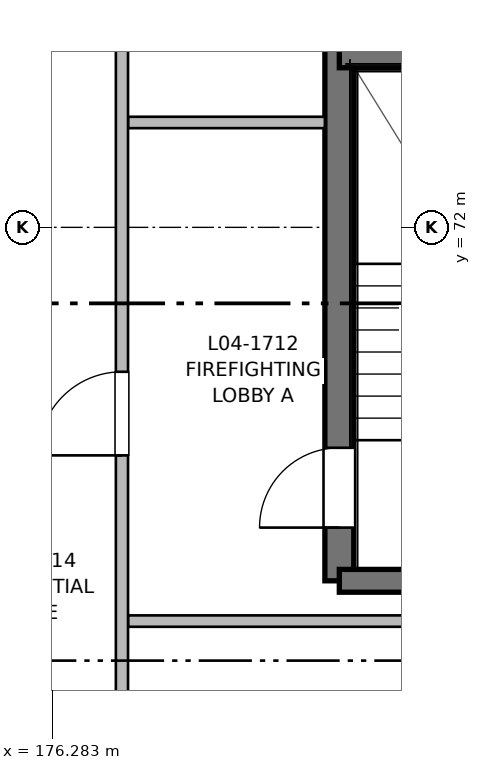
"""IFC4 building model, lengths in metres.
Left out: names, types, materials, properties, quantities, classifications, styles, units other than length and angle.
Written with IfcOpenShell. Run it as: python <this file> out.ifc"""

import sys

from ifc_helpers import new_model, si_unit, direction, frame, frame_2d, origin, place, context, subcontext, project, spatial, rectangle, extrude, element, fill, save


model = new_model("IFC4")
c1 = context("Model", 3, precision=1e-05, world=origin(), true_north=direction((0.0, 1.0)))
c2 = subcontext(c1, "Body", "Model", "MODEL_VIEW")
j1 = project(units=[si_unit("LENGTHUNIT", "METRE"), si_unit("PLANEANGLEUNIT", "RADIAN")], contexts=[c1])
p1 = place(None, origin())
s1 = spatial("IfcSite", under=j1, at=p1, CompositionType="ELEMENT")
p2 = place(p1, origin())
s2 = spatial("IfcBuilding", under=s1, at=p2, CompositionType="ELEMENT")
p3 = place(p2, frame((0.0, 0.0, 13.76)))
s3 = spatial("IfcBuildingStorey", under=s2, at=p3, CompositionType="ELEMENT", Elevation=13.76)
p4 = place(p3, frame((180.06, 67.35, 0.0), z_axis=(0.0, 0.0, 1.0), x_axis=(0.0, 1.0, 0.0)))
e1 = element("IfcWall", 1, at=p4, inside=s3, PredefinedType="SHEAR", context=c2, shape_type="SweptSolid", body=[
    extrude(rectangle(XDim=13.15, YDim=0.38, at=frame_2d((6.575, 0.0))), origin(), (0.0, 0.0, 1.0), 3.2),
])
p5 = place(p4, frame((0.7, 0.0, 0.0)))
e2 = element("IfcOpeningElement", 2, at=p5, cuts=e1, PredefinedType="OPENING", context=c2, shape_type="SweptSolid", body=[
    extrude(rectangle(XDim=1.05, YDim=2.15, at=frame_2d((0.525, 1.075))), frame((0.0, 0.2, 0.0), z_axis=(0.0, -1.0, 0.0), x_axis=(1.0, 0.0, 0.0)), (0.0, 0.0, 1.0), 0.4),
])
p6 = place(p3, frame((183.47, 67.35, 0.0), z_axis=(0.0, 0.0, 1.0), x_axis=(-1.0, 0.0, 0.0)))
e3 = element("IfcWall", 3, at=p6, inside=s3, PredefinedType="SHEAR", context=c2, shape_type="SweptSolid", body=[
    extrude(rectangle(XDim=3.41, YDim=0.3, at=frame_2d((1.705, 0.0))), origin(), (0.0, 0.0, 1.0), 3.2),
])
p7 = place(p3, frame((180.06, 74.24, 0.0), z_axis=(0.0, 0.0, 1.0), x_axis=(1.0, 0.0, 0.0)))
e4 = element("IfcWall", 4, at=p7, inside=s3, PredefinedType="SHEAR", context=c2, shape_type="SweptSolid", body=[
    extrude(rectangle(XDim=3.41, YDim=0.28, at=frame_2d((1.705, 0.0))), origin(), (0.0, 0.0, 1.0), 3.2),
])
p8 = place(p3, frame((177.28, 66.82, 0.0), z_axis=(0.0, 0.0, 1.0), x_axis=(1.0, 0.0, 0.0)))
e5 = element("IfcWall", 5, at=p8, inside=s3, PredefinedType="PARTITIONING", context=c2, shape_type="SweptSolid", body=[
    extrude(rectangle(XDim=6.6, YDim=0.15, at=frame_2d((3.3, 0.0))), origin(), (0.0, 0.0, 1.0), 2.935),
])
p9 = place(p3, frame((177.28, 73.38, 0.0), z_axis=(0.0, 0.0, 1.0), x_axis=(1.0, 0.0, 0.0)))
e6 = element("IfcWall", 6, at=p9, inside=s3, PredefinedType="PARTITIONING", context=c2, shape_type="SweptSolid", body=[
    extrude(rectangle(XDim=2.59, YDim=0.15, at=frame_2d((1.295, 0.0))), origin(), (0.0, 0.0, 1.0), 2.935),
])
p10 = place(p3, frame((177.2, 56.16, 0.0), z_axis=(0.0, 0.0, 1.0), x_axis=(0.0, 1.0, 0.0)))
e7 = element("IfcWall", 7, at=p10, inside=s3, PredefinedType="PARTITIONING", context=c2, shape_type="SweptSolid", body=[
    extrude(rectangle(XDim=50.64, YDim=0.16, at=frame_2d((25.32, 0.0))), origin(), (0.0, 0.0, 1.0), 2.935),
])
p11 = place(p10, frame((12.84, 0.0, 0.0)))
e8 = element("IfcOpeningElement", 8, at=p11, cuts=e7, PredefinedType="OPENING", context=c2, shape_type="SweptSolid", body=[
    extrude(rectangle(XDim=1.1, YDim=2.15, at=frame_2d((0.55, 1.075))), frame((0.0, 0.09, 0.0), z_axis=(0.0, -1.0, 0.0), x_axis=(1.0, 0.0, 0.0)), (0.0, 0.0, 1.0), 0.18),
])
p12 = place(p10, frame((19.24, 0.0, 0.0)))
e9 = element("IfcOpeningElement", 9, at=p12, cuts=e7, PredefinedType="OPENING", context=c2, shape_type="SweptSolid", body=[
    extrude(rectangle(XDim=1.6, YDim=2.15, at=frame_2d((0.8, 1.075))), frame((0.0, 0.09, 0.0), z_axis=(0.0, -1.0, 0.0), x_axis=(1.0, 0.0, 0.0)), (0.0, 0.0, 1.0), 0.18),
])
p13 = place(p10, frame((1.8, 0.0, 0.0)))
e10 = element("IfcOpeningElement", 10, at=p13, cuts=e7, PredefinedType="OPENING", context=c2, shape_type="SweptSolid", body=[
    extrude(rectangle(XDim=0.96, YDim=2.15, at=frame_2d((0.48, 1.075))), frame((0.0, 0.09, 0.0), z_axis=(0.0, -1.0, 0.0), x_axis=(1.0, 0.0, 0.0)), (0.0, 0.0, 1.0), 0.18),
])
p14 = place(p10, frame((32.87, 0.0, 0.0)))
e11 = element("IfcOpeningElement", 11, at=p14, cuts=e7, PredefinedType="OPENING", context=c2, shape_type="SweptSolid", body=[
    extrude(rectangle(XDim=0.98, YDim=2.15, at=frame_2d((0.49, 1.075))), frame((0.0, 0.09, 0.0), z_axis=(0.0, -1.0, 0.0), x_axis=(1.0, 0.0, 0.0)), (0.0, 0.0, 1.0), 0.18),
])
p15 = place(p10, frame((41.13, 0.0, 0.0)))
e12 = element("IfcOpeningElement", 12, at=p15, cuts=e7, PredefinedType="OPENING", context=c2, shape_type="SweptSolid", body=[
    extrude(rectangle(XDim=0.98, YDim=2.15, at=frame_2d((0.49, 1.075))), frame((0.0, 0.09, 0.0), z_axis=(0.0, -1.0, 0.0), x_axis=(1.0, 0.0, 0.0)), (0.0, 0.0, 1.0), 0.18),
])
p16 = place(p5, origin())
e13 = element("IfcDoor", 13, at=p16, inside=s3, OperationType="SINGLE_SWING_LEFT", PredefinedType="DOOR", context=c2, shape_type="SweptSolid", body=[
    extrude(rectangle(XDim=1.05, YDim=2.15, at=frame_2d((0.525, 1.075))), frame((0.0, 0.025, 0.0), z_axis=(0.0, -1.0, 0.0), x_axis=(1.0, 0.0, 0.0)), (0.0, 0.0, 1.0), 0.05),
])
fill(e2, e13)
p17 = place(p11, origin())
e14 = element("IfcDoor", 14, at=p17, inside=s3, OperationType="SINGLE_SWING_LEFT", PredefinedType="DOOR", context=c2, shape_type="SweptSolid", body=[
    extrude(rectangle(XDim=1.1, YDim=2.15, at=frame_2d((0.55, 1.075))), frame((0.0, 0.025, 0.0), z_axis=(0.0, -1.0, 0.0), x_axis=(1.0, 0.0, 0.0)), (0.0, 0.0, 1.0), 0.05),
])
fill(e8, e14)
save(model, sys.argv[1])
